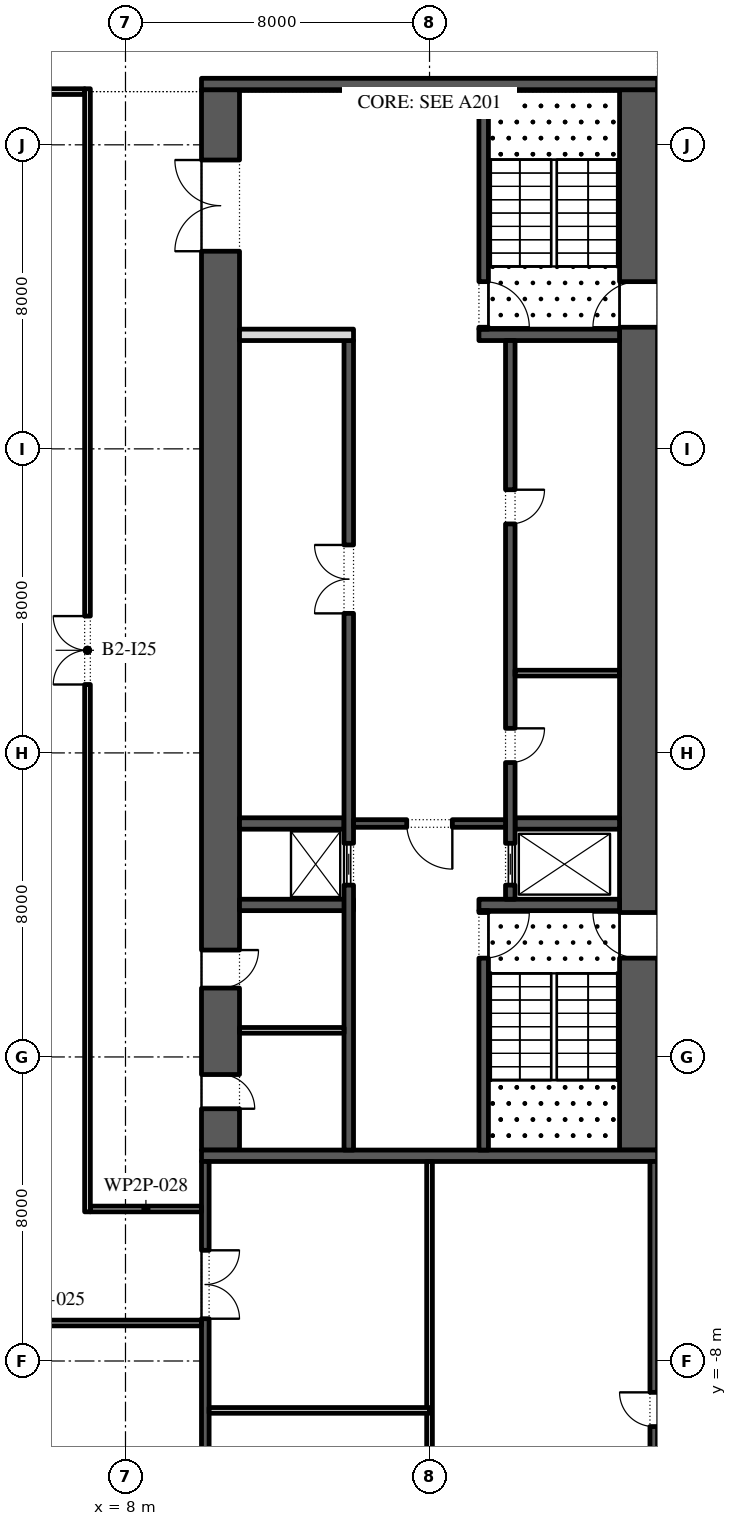
"""IFC4 building model, lengths in metres.
Left out: names, types, materials, properties, quantities, classifications, styles, units other than length and angle.
Written with IfcOpenShell. Run it as: python <this file> out.ifc"""

import sys

from ifc_helpers import new_model, si_unit, direction, frame, frame_2d, origin, place, context, subcontext, project, spatial, rectangle, extrude, element, fill, save


model = new_model("IFC4")
c1 = context("Model", 3, precision=1e-05, world=origin(), true_north=direction((0.0, 1.0)))
c2 = subcontext(c1, "Body", "Model", "MODEL_VIEW")
j1 = project(units=[si_unit("LENGTHUNIT", "METRE"), si_unit("PLANEANGLEUNIT", "RADIAN")], contexts=[c1])
p1 = place(None, origin())
s1 = spatial("IfcSite", under=j1, at=p1, CompositionType="ELEMENT")
p2 = place(p1, origin())
s2 = spatial("IfcBuilding", under=s1, at=p2, CompositionType="ELEMENT")
p3 = place(p2, frame((0.0, 0.0, -10.4)))
s3 = spatial("IfcBuildingStorey", under=s2, at=p3, CompositionType="ELEMENT", Elevation=-10.4)
p4 = place(p3, frame((21.5, -2.45, 0.0), z_axis=(0.0, 0.0, 1.0), x_axis=(0.0, 1.0, 0.0)))
e1 = element("IfcWall", 1, at=p4, inside=s3, PredefinedType="SHEAR", context=c2, shape_type="SweptSolid", body=[
    extrude(rectangle(XDim=27.9, YDim=1.0, at=frame_2d((13.95, 0.0))), origin(), (0.0, 0.0, 1.0), 4.9),
])
p5 = place(p4, frame((5.05, 0.0, 0.0)))
e2 = element("IfcOpeningElement", 2, at=p5, cuts=e1, PredefinedType="OPENING", context=c2, shape_type="SweptSolid", body=[
    extrude(rectangle(XDim=1.2, YDim=2.1, at=frame_2d((0.6, 1.05))), frame((0.0, 0.51, 0.0), z_axis=(0.0, -1.0, 0.0), x_axis=(1.0, 0.0, 0.0)), (0.0, 0.0, 1.0), 1.02),
])
p6 = place(p4, frame((21.65, 0.0, 0.0)))
e3 = element("IfcOpeningElement", 3, at=p6, cuts=e1, PredefinedType="OPENING", context=c2, shape_type="SweptSolid", body=[
    extrude(rectangle(XDim=1.2, YDim=2.1, at=frame_2d((0.6, 1.05))), frame((0.0, 0.51, 0.0), z_axis=(0.0, -1.0, 0.0), x_axis=(1.0, 0.0, 0.0)), (0.0, 0.0, 1.0), 1.02),
])
p7 = place(p3, frame((10.5, -2.45, 0.0), z_axis=(0.0, 0.0, 1.0), x_axis=(0.0, 1.0, 0.0)))
e4 = element("IfcWall", 4, at=p7, inside=s3, PredefinedType="SHEAR", context=c2, shape_type="SweptSolid", body=[
    extrude(rectangle(XDim=27.9, YDim=1.0, at=frame_2d((13.95, 0.0))), origin(), (0.0, 0.0, 1.0), 4.9),
])
p8 = place(p7, frame((23.65, 0.0, 0.0)))
e5 = element("IfcOpeningElement", 5, at=p8, cuts=e4, PredefinedType="OPENING", context=c2, shape_type="SweptSolid", body=[
    extrude(rectangle(XDim=2.4, YDim=2.1, at=frame_2d((1.2, 1.05))), frame((0.0, 0.51, 0.0), z_axis=(0.0, -1.0, 0.0), x_axis=(1.0, 0.0, 0.0)), (0.0, 0.0, 1.0), 1.02),
])
p9 = place(p7, frame((1.087, 0.0, 0.0)))
e6 = element("IfcOpeningElement", 6, at=p9, cuts=e4, PredefinedType="OPENING", context=c2, shape_type="SweptSolid", body=[
    extrude(rectangle(XDim=0.9, YDim=2.1, at=frame_2d((0.45, 1.05))), frame((0.0, 0.51, 0.0), z_axis=(0.0, -1.0, 0.0), x_axis=(1.0, 0.0, 0.0)), (0.0, 0.0, 1.0), 1.02),
])
p10 = place(p7, frame((4.262, 0.0, 0.0)))
e7 = element("IfcOpeningElement", 7, at=p10, cuts=e4, PredefinedType="OPENING", context=c2, shape_type="SweptSolid", body=[
    extrude(rectangle(XDim=1.0, YDim=2.1, at=frame_2d((0.5, 1.05))), frame((0.0, 0.51, 0.0), z_axis=(0.0, -1.0, 0.0), x_axis=(1.0, 0.0, 0.0)), (0.0, 0.0, 1.0), 1.02),
])
for number, where, z_axis, x_axis in (
    (8, (10.0, -2.6, 0.0), (0.0, 0.0, 1.0), (1.0, 0.0, 0.0)),
    (9, (10.0, 25.6, 0.0), (0.0, 0.0, 1.0), (1.0, 0.0, 0.0)),
):
    element("IfcWall", number, at=place(p3, frame(where, z_axis=z_axis, x_axis=x_axis)), inside=s3, PredefinedType="SHEAR", context=c2, shape_type="SweptSolid", body=[
        extrude(rectangle(XDim=12.0, YDim=0.3, at=frame_2d((6.0, 0.0))), origin(), (0.0, 0.0, 1.0), 4.9),
    ])
p11 = place(p3, frame((17.3, 4.0, 0.0), z_axis=(0.0, 0.0, 1.0), x_axis=(1.0, 0.0, 0.0)))
e10 = element("IfcWall", 10, at=p11, inside=s3, PredefinedType="SHEAR", context=c2, shape_type="SweptSolid", body=[
    extrude(rectangle(XDim=3.7, YDim=0.3, at=frame_2d((1.85, 0.0))), origin(), (0.0, 0.0, 1.0), 4.9),
])
p12 = place(p3, frame((17.425, -2.45, 0.0), z_axis=(0.0, 0.0, 1.0), x_axis=(0.0, 1.0, 0.0)))
e11 = element("IfcWall", 11, at=p12, inside=s3, PredefinedType="SHEAR", context=c2, shape_type="SweptSolid", body=[
    extrude(rectangle(XDim=6.3, YDim=0.25, at=frame_2d((3.15, 0.0))), origin(), (0.0, 0.0, 1.0), 4.9),
])
p13 = place(p12, frame((5.05, 0.0, 0.0)))
e12 = element("IfcOpeningElement", 12, at=p13, cuts=e11, PredefinedType="OPENING", context=c2, shape_type="SweptSolid", body=[
    extrude(rectangle(XDim=1.2, YDim=2.1, at=frame_2d((0.6, 1.05))), frame((0.0, 0.135, 0.0), z_axis=(0.0, -1.0, 0.0), x_axis=(1.0, 0.0, 0.0)), (0.0, 0.0, 1.0), 0.27),
])
p14 = place(p3, frame((17.3, 19.0, 0.0), z_axis=(0.0, 0.0, 1.0), x_axis=(1.0, 0.0, 0.0)))
e13 = element("IfcWall", 13, at=p14, inside=s3, PredefinedType="SHEAR", context=c2, shape_type="SweptSolid", body=[
    extrude(rectangle(XDim=3.7, YDim=0.3, at=frame_2d((1.85, 0.0))), origin(), (0.0, 0.0, 1.0), 4.9),
])
p15 = place(p3, frame((17.425, 19.15, 0.0), z_axis=(0.0, 0.0, 1.0), x_axis=(0.0, 1.0, 0.0)))
e14 = element("IfcWall", 14, at=p15, inside=s3, PredefinedType="SHEAR", context=c2, shape_type="SweptSolid", body=[
    extrude(rectangle(XDim=6.3, YDim=0.25, at=frame_2d((3.15, 0.0))), origin(), (0.0, 0.0, 1.0), 4.9),
])
p16 = place(p15, frame((0.05, 0.0, 0.0)))
e15 = element("IfcOpeningElement", 15, at=p16, cuts=e14, PredefinedType="OPENING", context=c2, shape_type="SweptSolid", body=[
    extrude(rectangle(XDim=1.2, YDim=2.1, at=frame_2d((0.6, 1.05))), frame((0.0, 0.135, 0.0), z_axis=(0.0, -1.0, 0.0), x_axis=(1.0, 0.0, 0.0)), (0.0, 0.0, 1.0), 0.27),
])
p17 = place(p3, frame((18.25, 6.143, 0.0), z_axis=(0.0, 0.0, 1.0), x_axis=(1.0, 0.0, 0.0)))
e16 = element("IfcWall", 16, at=p17, inside=s3, PredefinedType="SHEAR", context=c2, shape_type="SweptSolid", body=[
    extrude(rectangle(XDim=2.75, YDim=0.3, at=frame_2d((1.375, 0.0))), origin(), (0.0, 0.0, 1.0), 4.9),
])
p18 = place(p3, frame((18.125, 4.15, 0.0), z_axis=(0.0, 0.0, 1.0), x_axis=(0.0, 1.0, 0.0)))
e17 = element("IfcWall", 17, at=p18, inside=s3, PredefinedType="SHEAR", context=c2, shape_type="SweptSolid", body=[
    extrude(rectangle(XDim=14.7, YDim=0.25, at=frame_2d((7.35, 0.0))), origin(), (0.0, 0.0, 1.0), 4.9),
])
p19 = place(p18, frame((3.596, 0.0, 0.0)))
e18 = element("IfcOpeningElement", 18, at=p19, cuts=e17, PredefinedType="OPENING", context=c2, shape_type="SweptSolid", body=[
    extrude(rectangle(XDim=0.9, YDim=2.1, at=frame_2d((0.45, 1.05))), frame((0.0, 0.135, 0.0), z_axis=(0.0, -1.0, 0.0), x_axis=(1.0, 0.0, 0.0)), (0.0, 0.0, 1.0), 0.27),
])
p20 = place(p18, frame((9.875, 0.0, 0.0)))
e19 = element("IfcOpeningElement", 19, at=p20, cuts=e17, PredefinedType="OPENING", context=c2, shape_type="SweptSolid", body=[
    extrude(rectangle(XDim=0.9, YDim=2.1, at=frame_2d((0.45, 1.05))), frame((0.0, 0.135, 0.0), z_axis=(0.0, -1.0, 0.0), x_axis=(1.0, 0.0, 0.0)), (0.0, 0.0, 1.0), 0.27),
])
p21 = place(p18, frame((0.371, 0.0, 0.0)))
e20 = element("IfcOpeningElement", 20, at=p21, cuts=e17, PredefinedType="OPENING", context=c2, shape_type="SweptSolid", body=[
    extrude(rectangle(XDim=1.1, YDim=2.1, at=frame_2d((0.55, 1.05))), frame((0.0, 0.135, 0.0), z_axis=(0.0, -1.0, 0.0), x_axis=(1.0, 0.0, 0.0)), (0.0, 0.0, 1.0), 0.27),
])
p22 = place(p3, frame((18.25, 10.1, 0.0), z_axis=(0.0, 0.0, 1.0), x_axis=(1.0, 0.0, 0.0)))
e21 = element("IfcWall", 21, at=p22, inside=s3, PredefinedType="PARTITIONING", context=c2, shape_type="SweptSolid", body=[
    extrude(rectangle(XDim=2.75, YDim=0.15, at=frame_2d((1.375, 0.0))), origin(), (0.0, 0.0, 1.0), 4.9),
])
p23 = place(p3, frame((11.0, 4.0, 0.0), z_axis=(0.0, 0.0, 1.0), x_axis=(1.0, 0.0, 0.0)))
e22 = element("IfcWall", 22, at=p23, inside=s3, PredefinedType="SHEAR", context=c2, shape_type="SweptSolid", body=[
    extrude(rectangle(XDim=3.0, YDim=0.3, at=frame_2d((1.5, 0.0))), origin(), (0.0, 0.0, 1.0), 4.9),
])
p24 = place(p3, frame((11.0, 6.143, 0.0), z_axis=(0.0, 0.0, 1.0), x_axis=(1.0, 0.0, 0.0)))
e23 = element("IfcWall", 23, at=p24, inside=s3, PredefinedType="SHEAR", context=c2, shape_type="SweptSolid", body=[
    extrude(rectangle(XDim=2.75, YDim=0.3, at=frame_2d((1.375, 0.0))), origin(), (0.0, 0.0, 1.0), 4.9),
])
p25 = place(p3, frame((13.875, -2.45, 0.0), z_axis=(0.0, 0.0, 1.0), x_axis=(0.0, 1.0, 0.0)))
e24 = element("IfcWall", 24, at=p25, inside=s3, PredefinedType="SHEAR", context=c2, shape_type="SweptSolid", body=[
    extrude(rectangle(XDim=21.3, YDim=0.25, at=frame_2d((10.65, 0.0))), origin(), (0.0, 0.0, 1.0), 4.9),
])
p26 = place(p25, frame((14.121, 0.0, 0.0)))
e25 = element("IfcOpeningElement", 25, at=p26, cuts=e24, PredefinedType="OPENING", context=c2, shape_type="SweptSolid", body=[
    extrude(rectangle(XDim=1.8, YDim=2.4, at=frame_2d((0.9, 1.2))), frame((0.0, 0.135, 0.0), z_axis=(0.0, -1.0, 0.0), x_axis=(1.0, 0.0, 0.0)), (0.0, 0.0, 1.0), 0.27),
])
p27 = place(p25, frame((6.971, 0.0, 0.0)))
e26 = element("IfcOpeningElement", 26, at=p27, cuts=e24, PredefinedType="OPENING", context=c2, shape_type="SweptSolid", body=[
    extrude(rectangle(XDim=1.1, YDim=2.1, at=frame_2d((0.55, 1.05))), frame((0.0, 0.135, 0.0), z_axis=(0.0, -1.0, 0.0), x_axis=(1.0, 0.0, 0.0)), (0.0, 0.0, 1.0), 0.27),
])
p28 = place(p3, frame((11.0, 19.0, 0.0), z_axis=(0.0, 0.0, 1.0), x_axis=(1.0, 0.0, 0.0)))
e27 = element("IfcWall", 27, at=p28, inside=s3, PredefinedType="PARTITIONING", context=c2, shape_type="SweptSolid", body=[
    extrude(rectangle(XDim=3.0, YDim=0.3, at=frame_2d((1.5, 0.0))), origin(), (0.0, 0.0, 1.0), 4.9),
])
p29 = place(p3, frame((14.0, 6.143, 0.0), z_axis=(0.0, 0.0, 1.0), x_axis=(1.0, 0.0, 0.0)))
e28 = element("IfcWall", 28, at=p29, inside=s3, PredefinedType="SHEAR", context=c2, shape_type="SweptSolid", body=[
    extrude(rectangle(XDim=4.0, YDim=0.2, at=frame_2d((2.0, 0.0))), origin(), (0.0, 0.0, 1.0), 4.9),
])
p30 = place(p29, frame((1.4, 0.0, 0.0)))
e29 = element("IfcOpeningElement", 29, at=p30, cuts=e28, PredefinedType="OPENING", context=c2, shape_type="SweptSolid", body=[
    extrude(rectangle(XDim=1.2, YDim=2.1, at=frame_2d((0.6, 1.05))), frame((0.0, 0.11, 0.0), z_axis=(0.0, -1.0, 0.0), x_axis=(1.0, 0.0, 0.0)), (0.0, 0.0, 1.0), 0.22),
])
p31 = place(p3, frame((11.0, 0.7, 0.0), z_axis=(0.0, 0.0, 1.0), x_axis=(1.0, 0.0, 0.0)))
e30 = element("IfcWall", 30, at=p31, inside=s3, PredefinedType="PARTITIONING", context=c2, shape_type="SweptSolid", body=[
    extrude(rectangle(XDim=2.75, YDim=0.15, at=frame_2d((1.375, 0.0))), origin(), (0.0, 0.0, 1.0), 4.9),
])
p32 = place(p3, frame((21.9, -15.8, 0.0), z_axis=(0.0, 0.0, 1.0), x_axis=(0.0, 1.0, 0.0)))
e31 = element("IfcWall", 31, at=p32, inside=s3, PredefinedType="SHEAR", context=c2, shape_type="SweptSolid", body=[
    extrude(rectangle(XDim=13.05, YDim=0.2, at=frame_2d((6.525, 0.0))), origin(), (0.0, 0.0, 1.0), 4.9),
])
p33 = place(p32, frame((6.075, 0.0, 0.0)))
e32 = element("IfcOpeningElement", 32, at=p33, cuts=e31, PredefinedType="OPENING", context=c2, shape_type="SweptSolid", body=[
    extrude(rectangle(XDim=0.9, YDim=2.1, at=frame_2d((0.45, 1.05))), frame((0.0, 0.11, 0.0), z_axis=(0.0, -1.0, 0.0), x_axis=(1.0, 0.0, 0.0)), (0.0, 0.0, 1.0), 0.22),
])
p34 = place(p3, frame((10.1, -15.8, 0.0), z_axis=(0.0, 0.0, 1.0), x_axis=(0.0, 1.0, 0.0)))
e33 = element("IfcWall", 33, at=p34, inside=s3, PredefinedType="SHEAR", context=c2, shape_type="SweptSolid", body=[
    extrude(rectangle(XDim=13.05, YDim=0.2, at=frame_2d((6.525, 0.0))), origin(), (0.0, 0.0, 1.0), 4.9),
])
p35 = place(p34, frame((2.312, 0.0, 0.0)))
e34 = element("IfcOpeningElement", 34, at=p35, cuts=e33, PredefinedType="OPENING", context=c2, shape_type="SweptSolid", body=[
    extrude(rectangle(XDim=1.8, YDim=2.4, at=frame_2d((0.9, 1.2))), frame((0.0, 0.11, 0.0), z_axis=(0.0, -1.0, 0.0), x_axis=(1.0, 0.0, 0.0)), (0.0, 0.0, 1.0), 0.22),
])
p36 = place(p34, frame((8.913, 0.0, 0.0)))
e35 = element("IfcOpeningElement", 35, at=p36, cuts=e33, PredefinedType="OPENING", context=c2, shape_type="SweptSolid", body=[
    extrude(rectangle(XDim=1.8, YDim=2.4, at=frame_2d((0.9, 1.2))), frame((0.0, 0.11, 0.0), z_axis=(0.0, -1.0, 0.0), x_axis=(1.0, 0.0, 0.0)), (0.0, 0.0, 1.0), 0.22),
])
p37 = place(p3, frame((16.0, -15.8, 0.0), z_axis=(0.0, 0.0, 1.0), x_axis=(0.0, 1.0, 0.0)))
e36 = element("IfcWall", 36, at=p37, inside=s3, PredefinedType="PARTITIONING", context=c2, shape_type="SweptSolid", body=[
    extrude(rectangle(XDim=13.05, YDim=0.15, at=frame_2d((6.525, 0.0))), origin(), (0.0, 0.0, 1.0), 4.9),
])
p38 = place(p3, frame((10.2, -9.3, 0.0), z_axis=(0.0, 0.0, 1.0), x_axis=(1.0, 0.0, 0.0)))
e37 = element("IfcWall", 37, at=p38, inside=s3, PredefinedType="PARTITIONING", context=c2, shape_type="SweptSolid", body=[
    extrude(rectangle(XDim=5.8, YDim=0.15, at=frame_2d((2.9, 0.0))), origin(), (0.0, 0.0, 1.0), 4.9),
])
p39 = place(p3, frame((1.575, -7.0, 0.0), z_axis=(0.0, 0.0, 1.0), x_axis=(1.0, 0.0, 0.0)))
e38 = element("IfcWall", 38, at=p39, inside=s3, PredefinedType="PARTITIONING", context=c2, shape_type="SweptSolid", body=[
    extrude(rectangle(XDim=8.425, YDim=0.15, at=frame_2d((4.212, 0.0))), origin(), (0.0, 0.0, 1.0), 4.9),
])
p40 = place(p3, frame((7.075, -4.0, 0.0), z_axis=(0.0, 0.0, 1.0), x_axis=(1.0, 0.0, 0.0)))
e39 = element("IfcWall", 39, at=p40, inside=s3, PredefinedType="PARTITIONING", context=c2, shape_type="SweptSolid", body=[
    extrude(rectangle(XDim=2.925, YDim=0.15, at=frame_2d((1.462, 0.0))), origin(), (0.0, 0.0, 1.0), 3.93),
])
p41 = place(p3, frame((1.575, 25.4, 0.0), z_axis=(0.0, 0.0, 1.0), x_axis=(1.0, 0.0, 0.0)))
e40 = element("IfcWall", 40, at=p41, inside=s3, PredefinedType="PARTITIONING", context=c2, shape_type="SweptSolid", body=[
    extrude(rectangle(XDim=5.35, YDim=0.15, at=frame_2d((2.675, 0.0))), origin(), (0.0, 0.0, 1.0), 4.9),
])
p42 = place(p3, frame((7.0, -4.075, 0.0), z_axis=(0.0, 0.0, 1.0), x_axis=(0.0, 1.0, 0.0)))
e41 = element("IfcWall", 41, at=p42, inside=s3, PredefinedType="PARTITIONING", context=c2, shape_type="SweptSolid", body=[
    extrude(rectangle(XDim=29.55, YDim=0.15, at=frame_2d((14.775, 0.0))), origin(), (0.0, 0.0, 1.0), 4.9),
])
p43 = place(p42, frame((13.875, 0.0, 0.0)))
e42 = element("IfcOpeningElement", 42, at=p43, cuts=e41, PredefinedType="OPENING", context=c2, shape_type="SweptSolid", body=[
    extrude(rectangle(XDim=1.8, YDim=2.1, at=frame_2d((0.9, 1.05))), frame((0.0, 0.085, 0.0), z_axis=(0.0, -1.0, 0.0), x_axis=(1.0, 0.0, 0.0)), (0.0, 0.0, 1.0), 0.17),
])
p44 = place(p19, frame((0.9, -0.2, 0.0), z_axis=(0.0, 0.0, 1.0), x_axis=(-1.0, 0.0, 0.0)))
e43 = element("IfcDoor", 43, at=p44, inside=s3, OperationType="SINGLE_SWING_RIGHT", PredefinedType="DOOR", context=c2, shape_type="SweptSolid", body=[
    extrude(rectangle(XDim=0.9, YDim=2.1, at=frame_2d((0.45, 1.05))), frame((0.0, -0.075, 0.0), z_axis=(0.0, -1.0, 0.0), x_axis=(1.0, 0.0, 0.0)), (0.0, 0.0, 1.0), 0.05),
])
fill(e18, e43)
p45 = place(p20, frame((0.9, -0.2, 0.0), z_axis=(0.0, 0.0, 1.0), x_axis=(-1.0, 0.0, 0.0)))
e44 = element("IfcDoor", 44, at=p45, inside=s3, OperationType="SINGLE_SWING_RIGHT", PredefinedType="DOOR", context=c2, shape_type="SweptSolid", body=[
    extrude(rectangle(XDim=0.9, YDim=2.1, at=frame_2d((0.45, 1.05))), frame((0.0, -0.075, 0.0), z_axis=(0.0, -1.0, 0.0), x_axis=(1.0, 0.0, 0.0)), (0.0, 0.0, 1.0), 0.05),
])
fill(e19, e44)
p46 = place(p21, origin())
e45 = element("IfcDoor", 45, at=p46, inside=s3, OperationType="SLIDING_TO_LEFT", PredefinedType="DOOR", context=c2, shape_type="SweptSolid", body=[
    extrude(rectangle(XDim=1.1, YDim=2.1, at=frame_2d((0.55, 1.05))), frame((0.0, 0.025, 0.0), z_axis=(0.0, -1.0, 0.0), x_axis=(1.0, 0.0, 0.0)), (0.0, 0.0, 1.0), 0.05),
])
fill(e20, e45)
p47 = place(p26, origin())
e46 = element("IfcDoor", 46, at=p47, inside=s3, OperationType="DOUBLE_DOOR_SINGLE_SWING", PredefinedType="DOOR", context=c2, shape_type="SweptSolid", body=[
    extrude(rectangle(XDim=1.8, YDim=2.4, at=frame_2d((0.9, 1.2))), frame((0.0, 0.125, 0.0), z_axis=(0.0, -1.0, 0.0), x_axis=(1.0, 0.0, 0.0)), (0.0, 0.0, 1.0), 0.05),
])
fill(e25, e46)
p48 = place(p27, origin())
e47 = element("IfcDoor", 47, at=p48, inside=s3, OperationType="SLIDING_TO_LEFT", PredefinedType="DOOR", context=c2, shape_type="SweptSolid", body=[
    extrude(rectangle(XDim=1.1, YDim=2.1, at=frame_2d((0.55, 1.05))), frame((0.0, 0.025, 0.0), z_axis=(0.0, -1.0, 0.0), x_axis=(1.0, 0.0, 0.0)), (0.0, 0.0, 1.0), 0.05),
])
fill(e26, e47)
p49 = place(p30, frame((1.2, 0.0, 0.0), z_axis=(0.0, 0.0, 1.0), x_axis=(-1.0, 0.0, 0.0)))
e48 = element("IfcDoor", 48, at=p49, inside=s3, OperationType="SINGLE_SWING_RIGHT", PredefinedType="DOOR", context=c2, shape_type="SweptSolid", body=[
    extrude(rectangle(XDim=1.2, YDim=2.1, at=frame_2d((0.6, 1.05))), frame((0.0, 0.025, 0.0), z_axis=(0.0, -1.0, 0.0), x_axis=(1.0, 0.0, 0.0)), (0.0, 0.0, 1.0), 0.05),
])
fill(e29, e48)
p50 = place(p8, origin())
e49 = element("IfcDoor", 49, at=p50, inside=s3, OperationType="DOUBLE_DOOR_SINGLE_SWING", PredefinedType="DOOR", context=c2, shape_type="SweptSolid", body=[
    extrude(rectangle(XDim=2.4, YDim=2.1, at=frame_2d((1.2, 1.05))), frame((0.0, 0.025, 0.0), z_axis=(0.0, -1.0, 0.0), x_axis=(1.0, 0.0, 0.0)), (0.0, 0.0, 1.0), 0.05),
])
fill(e5, e49)
p51 = place(p13, frame((1.2, 0.0, 0.0), z_axis=(0.0, 0.0, 1.0), x_axis=(-1.0, 0.0, 0.0)))
e50 = element("IfcDoor", 50, at=p51, inside=s3, OperationType="SINGLE_SWING_RIGHT", PredefinedType="DOOR", context=c2, shape_type="SweptSolid", body=[
    extrude(rectangle(XDim=1.2, YDim=2.1, at=frame_2d((0.6, 1.05))), frame((0.0, 0.025, 0.0), z_axis=(0.0, -1.0, 0.0), x_axis=(1.0, 0.0, 0.0)), (0.0, 0.0, 1.0), 0.05),
])
fill(e12, e50)
p52 = place(p5, origin())
e51 = element("IfcDoor", 51, at=p52, inside=s3, OperationType="SINGLE_SWING_LEFT", PredefinedType="DOOR", context=c2, shape_type="SweptSolid", body=[
    extrude(rectangle(XDim=1.2, YDim=2.1, at=frame_2d((0.6, 1.05))), frame((0.0, 0.025, 0.0), z_axis=(0.0, -1.0, 0.0), x_axis=(1.0, 0.0, 0.0)), (0.0, 0.0, 1.0), 0.05),
])
fill(e2, e51)
p53 = place(p16, frame((1.2, 0.0, 0.0), z_axis=(0.0, 0.0, 1.0), x_axis=(-1.0, 0.0, 0.0)))
e52 = element("IfcDoor", 52, at=p53, inside=s3, OperationType="SINGLE_SWING_LEFT", PredefinedType="DOOR", context=c2, shape_type="SweptSolid", body=[
    extrude(rectangle(XDim=1.2, YDim=2.1, at=frame_2d((0.6, 1.05))), frame((0.0, 0.025, 0.0), z_axis=(0.0, -1.0, 0.0), x_axis=(1.0, 0.0, 0.0)), (0.0, 0.0, 1.0), 0.05),
])
fill(e15, e52)
p54 = place(p6, origin())
e53 = element("IfcDoor", 53, at=p54, inside=s3, OperationType="SINGLE_SWING_RIGHT", PredefinedType="DOOR", context=c2, shape_type="SweptSolid", body=[
    extrude(rectangle(XDim=1.2, YDim=2.1, at=frame_2d((0.6, 1.05))), frame((0.0, 0.025, 0.0), z_axis=(0.0, -1.0, 0.0), x_axis=(1.0, 0.0, 0.0)), (0.0, 0.0, 1.0), 0.05),
])
fill(e3, e53)
p55 = place(p9, frame((0.9, -0.95, 0.0), z_axis=(0.0, 0.0, 1.0), x_axis=(-1.0, 0.0, 0.0)))
e54 = element("IfcDoor", 54, at=p55, inside=s3, OperationType="SINGLE_SWING_LEFT", PredefinedType="DOOR", context=c2, shape_type="SweptSolid", body=[
    extrude(rectangle(XDim=0.9, YDim=2.1, at=frame_2d((0.45, 1.05))), frame((0.0, -0.45, 0.0), z_axis=(0.0, -1.0, 0.0), x_axis=(1.0, 0.0, 0.0)), (0.0, 0.0, 1.0), 0.05),
])
fill(e6, e54)
p56 = place(p10, frame((1.0, -0.95, 0.0), z_axis=(0.0, 0.0, 1.0), x_axis=(-1.0, 0.0, 0.0)))
e55 = element("IfcDoor", 55, at=p56, inside=s3, OperationType="SINGLE_SWING_RIGHT", PredefinedType="DOOR", context=c2, shape_type="SweptSolid", body=[
    extrude(rectangle(XDim=1.0, YDim=2.1, at=frame_2d((0.5, 1.05))), frame((0.0, -0.45, 0.0), z_axis=(0.0, -1.0, 0.0), x_axis=(1.0, 0.0, 0.0)), (0.0, 0.0, 1.0), 0.05),
])
fill(e7, e55)
p57 = place(p33, origin())
e56 = element("IfcDoor", 56, at=p57, inside=s3, OperationType="SINGLE_SWING_LEFT", PredefinedType="DOOR", context=c2, shape_type="SweptSolid", body=[
    extrude(rectangle(XDim=0.9, YDim=2.1, at=frame_2d((0.45, 1.05))), frame((0.0, 0.1, 0.0), z_axis=(0.0, -1.0, 0.0), x_axis=(1.0, 0.0, 0.0)), (0.0, 0.0, 1.0), 0.05),
])
fill(e32, e56)
p58 = place(p36, frame((1.8, -0.15, 0.0), z_axis=(0.0, 0.0, 1.0), x_axis=(-1.0, 0.0, 0.0)))
e57 = element("IfcDoor", 57, at=p58, inside=s3, OperationType="DOUBLE_DOOR_SINGLE_SWING", PredefinedType="DOOR", context=c2, shape_type="SweptSolid", body=[
    extrude(rectangle(XDim=1.8, YDim=2.4, at=frame_2d((0.9, 1.2))), frame((0.0, -0.05, 0.0), z_axis=(0.0, -1.0, 0.0), x_axis=(1.0, 0.0, 0.0)), (0.0, 0.0, 1.0), 0.05),
])
fill(e35, e57)
p59 = place(p43, origin())
e58 = element("IfcDoor", 58, at=p59, inside=s3, OperationType="SINGLE_SWING_RIGHT", PredefinedType="DOOR", context=c2, shape_type="SweptSolid", body=[
    extrude(rectangle(XDim=1.8, YDim=2.1, at=frame_2d((0.9, 1.05))), frame((0.0, 0.025, 0.0), z_axis=(0.0, -1.0, 0.0), x_axis=(1.0, 0.0, 0.0)), (0.0, 0.0, 1.0), 0.05),
])
fill(e42, e58)
save(model, sys.argv[1])
